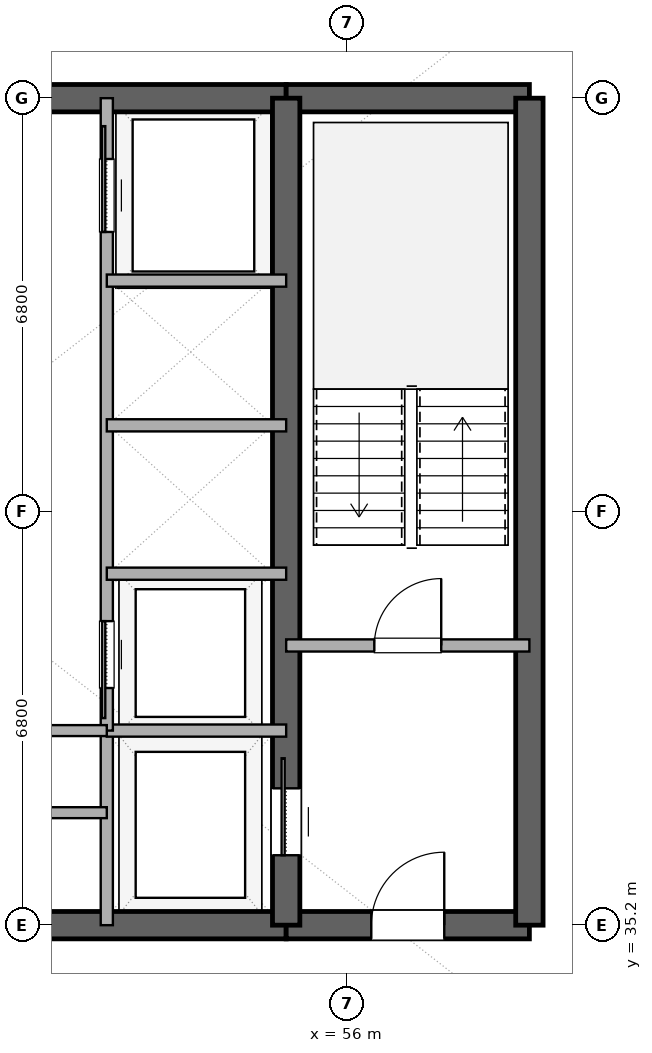
"""IFC4 building model, lengths in metres.
Left out: names, types, materials, properties, quantities, classifications, styles, units other than length and angle.
Written with IfcOpenShell. Run it as: python <this file> out.ifc"""

import sys

from ifc_helpers import new_model, si_unit, direction, frame, frame_2d, origin, place, context, subcontext, project, spatial, rectangle, extrude, element, fill, save


model = new_model("IFC4")
c1 = context("Model", 3, precision=1e-05, world=origin(), true_north=direction((0.0, 1.0)))
c2 = subcontext(c1, "Body", "Model", "MODEL_VIEW")
j1 = project(units=[si_unit("LENGTHUNIT", "METRE"), si_unit("PLANEANGLEUNIT", "RADIAN")], contexts=[c1])
p1 = place(None, origin())
s1 = spatial("IfcSite", under=j1, at=p1, CompositionType="ELEMENT")
p2 = place(p1, origin())
s2 = spatial("IfcBuilding", under=s1, at=p2, CompositionType="ELEMENT")
p3 = place(p2, frame((0.0, 0.0, 154.2)))
s3 = spatial("IfcBuildingStorey", under=s2, at=p3, CompositionType="ELEMENT", Elevation=154.2)
p4 = place(p3, frame((41.0, 35.2, 0.0), z_axis=(0.0, 0.0, 1.0), x_axis=(1.0, 0.0, 0.0)))
e1 = element("IfcWall", 1, at=p4, inside=s3, PredefinedType="SHEAR", context=c2, shape_type="SweptSolid", body=[
    extrude(rectangle(XDim=14.0, YDim=0.45, at=frame_2d((7.0, 0.0))), origin(), (0.0, 0.0, 1.0), 3.38),
])
p5 = place(p4, frame((6.1, 0.0, 0.0)))
e2 = element("IfcOpeningElement", 2, at=p5, cuts=e1, PredefinedType="OPENING", context=c2, shape_type="SweptSolid", body=[
    extrude(rectangle(XDim=1.8, YDim=2.25, at=frame_2d((0.9, 1.125))), frame((0.0, 0.235, 0.0), z_axis=(0.0, -1.0, 0.0), x_axis=(1.0, 0.0, 0.0)), (0.0, 0.0, 1.0), 0.47),
])
p6 = place(p3, frame((55.0, 35.2, 0.0), z_axis=(0.0, 0.0, 1.0), x_axis=(1.0, 0.0, 0.0)))
e3 = element("IfcWall", 3, at=p6, inside=s3, PredefinedType="SHEAR", context=c2, shape_type="SweptSolid", body=[
    extrude(rectangle(XDim=4.0, YDim=0.45, at=frame_2d((2.0, 0.0))), origin(), (0.0, 0.0, 1.0), 3.38),
])
p7 = place(p6, frame((1.4, 0.0, 0.0)))
e4 = element("IfcOpeningElement", 4, at=p7, cuts=e3, PredefinedType="OPENING", context=c2, shape_type="SweptSolid", body=[
    extrude(rectangle(XDim=1.2, YDim=2.15, at=frame_2d((0.6, 1.075))), frame((0.0, 0.235, 0.0), z_axis=(0.0, -1.0, 0.0), x_axis=(1.0, 0.0, 0.0)), (0.0, 0.0, 1.0), 0.47),
])
p8 = place(p3, frame((41.0, 48.8, 0.0), z_axis=(0.0, 0.0, 1.0), x_axis=(1.0, 0.0, 0.0)))
e5 = element("IfcWall", 5, at=p8, inside=s3, PredefinedType="SHEAR", context=c2, shape_type="SweptSolid", body=[
    extrude(rectangle(XDim=14.0, YDim=0.45, at=frame_2d((7.0, 0.0))), origin(), (0.0, 0.0, 1.0), 3.38),
])
p9 = place(p8, frame((6.1, 0.0, 0.0)))
e6 = element("IfcOpeningElement", 6, at=p9, cuts=e5, PredefinedType="OPENING", context=c2, shape_type="SweptSolid", body=[
    extrude(rectangle(XDim=1.8, YDim=2.25, at=frame_2d((0.9, 1.125))), frame((0.0, 0.235, 0.0), z_axis=(0.0, -1.0, 0.0), x_axis=(1.0, 0.0, 0.0)), (0.0, 0.0, 1.0), 0.47),
])
p10 = place(p3, frame((55.0, 48.8, 0.0), z_axis=(0.0, 0.0, 1.0), x_axis=(1.0, 0.0, 0.0)))
e7 = element("IfcWall", 7, at=p10, inside=s3, PredefinedType="SHEAR", context=c2, shape_type="SweptSolid", body=[
    extrude(rectangle(XDim=4.0, YDim=0.45, at=frame_2d((2.0, 0.0))), origin(), (0.0, 0.0, 1.0), 3.38),
])
p11 = place(p3, frame((59.0, 35.2, 0.0), z_axis=(0.0, 0.0, 1.0), x_axis=(0.0, 1.0, 0.0)))
e8 = element("IfcWall", 8, at=p11, inside=s3, PredefinedType="SHEAR", context=c2, shape_type="SweptSolid", body=[
    extrude(rectangle(XDim=13.6, YDim=0.45, at=frame_2d((6.8, 0.0))), origin(), (0.0, 0.0, 1.0), 3.38),
])
p12 = place(p3, frame((55.0, 35.2, 0.0), z_axis=(0.0, 0.0, 1.0), x_axis=(0.0, 1.0, 0.0)))
e9 = element("IfcWall", 9, at=p12, inside=s3, PredefinedType="SHEAR", context=c2, shape_type="SweptSolid", body=[
    extrude(rectangle(XDim=13.6, YDim=0.45, at=frame_2d((6.8, 0.0))), origin(), (0.0, 0.0, 1.0), 3.38),
])
p13 = place(p12, frame((1.15, 0.0, 0.0)))
e10 = element("IfcOpeningElement", 10, at=p13, cuts=e9, PredefinedType="OPENING", context=c2, shape_type="SweptSolid", body=[
    extrude(rectangle(XDim=1.1, YDim=2.2, at=frame_2d((0.55, 1.1))), frame((0.0, 0.235, 0.0), z_axis=(0.0, -1.0, 0.0), x_axis=(1.0, 0.0, 0.0)), (0.0, 0.0, 1.0), 0.47),
])
p14 = place(p3, frame((55.0, 39.8, 0.0), z_axis=(0.0, 0.0, 1.0), x_axis=(1.0, 0.0, 0.0)))
e11 = element("IfcWall", 11, at=p14, inside=s3, PredefinedType="SOLIDWALL", context=c2, shape_type="SweptSolid", body=[
    extrude(rectangle(XDim=4.0, YDim=0.2, at=frame_2d((2.0, 0.0))), origin(), (0.0, 0.0, 1.0), 2.74),
])
p15 = place(p14, frame((1.45, 0.0, 0.0)))
e12 = element("IfcOpeningElement", 12, at=p15, cuts=e11, PredefinedType="OPENING", context=c2, shape_type="SweptSolid", body=[
    extrude(rectangle(XDim=1.1, YDim=2.15, at=frame_2d((0.55, 1.075))), frame((0.0, 0.11, 0.0), z_axis=(0.0, -1.0, 0.0), x_axis=(1.0, 0.0, 0.0)), (0.0, 0.0, 1.0), 0.22),
])
p16 = place(p3, frame((52.05, 35.2, 0.0), z_axis=(0.0, 0.0, 1.0), x_axis=(0.0, 1.0, 0.0)))
e13 = element("IfcWall", 13, at=p16, inside=s3, PredefinedType="SOLIDWALL", context=c2, shape_type="SweptSolid", body=[
    extrude(rectangle(XDim=3.2, YDim=0.2, at=frame_2d((1.6, 0.0))), origin(), (0.0, 0.0, 1.0), 2.74),
])
p17 = place(p3, frame((52.05, 38.4, 0.0), z_axis=(0.0, 0.0, 1.0), x_axis=(1.0, 0.0, 0.0)))
e14 = element("IfcWall", 14, at=p17, inside=s3, PredefinedType="SOLIDWALL", context=c2, shape_type="SweptSolid", body=[
    extrude(rectangle(XDim=2.95, YDim=0.2, at=frame_2d((1.475, 0.0))), origin(), (0.0, 0.0, 1.0), 2.74),
])
p18 = place(p3, frame((52.05, 38.4, 0.0), z_axis=(0.0, 0.0, 1.0), x_axis=(0.0, 1.0, 0.0)))
e15 = element("IfcWall", 15, at=p18, inside=s3, PredefinedType="SOLIDWALL", context=c2, shape_type="SweptSolid", body=[
    extrude(rectangle(XDim=10.4, YDim=0.2, at=frame_2d((5.2, 0.0))), origin(), (0.0, 0.0, 1.0), 2.74),
])
p19 = place(p18, frame((0.7, 0.0, 0.0)))
e16 = element("IfcOpeningElement", 16, at=p19, cuts=e15, PredefinedType="OPENING", context=c2, shape_type="SweptSolid", body=[
    extrude(rectangle(XDim=1.1, YDim=2.2, at=frame_2d((0.55, 1.1))), frame((0.0, 0.11, 0.0), z_axis=(0.0, -1.0, 0.0), x_axis=(1.0, 0.0, 0.0)), (0.0, 0.0, 1.0), 0.22),
])
p20 = place(p18, frame((8.2, 0.0, 0.0)))
e17 = element("IfcOpeningElement", 17, at=p20, cuts=e15, PredefinedType="OPENING", context=c2, shape_type="SweptSolid", body=[
    extrude(rectangle(XDim=1.2, YDim=2.2, at=frame_2d((0.6, 1.1))), frame((0.0, 0.11, 0.0), z_axis=(0.0, -1.0, 0.0), x_axis=(1.0, 0.0, 0.0)), (0.0, 0.0, 1.0), 0.22),
])
for number, where, z_axis, x_axis in (
    (18, (52.05, 40.98, 0.0), (0.0, 0.0, 1.0), (1.0, 0.0, 0.0)),
    (19, (52.05, 43.42, 0.0), (0.0, 0.0, 1.0), (1.0, 0.0, 0.0)),
    (20, (52.05, 45.8, 0.0), (0.0, 0.0, 1.0), (1.0, 0.0, 0.0)),
):
    element("IfcWall", number, at=place(p3, frame(where, z_axis=z_axis, x_axis=x_axis)), inside=s3, PredefinedType="SOLIDWALL", context=c2, shape_type="SweptSolid", body=[
        extrude(rectangle(XDim=2.95, YDim=0.2, at=frame_2d((1.475, 0.0))), origin(), (0.0, 0.0, 1.0), 2.74),
    ])
for number, where, z_axis, x_axis in (
    (21, (49.2, 37.05, 0.0), (0.0, 0.0, 1.0), (1.0, 0.0, 0.0)),
    (22, (49.2, 38.4, 0.0), (0.0, 0.0, 1.0), (1.0, 0.0, 0.0)),
):
    element("IfcWall", number, at=place(p3, frame(where, z_axis=z_axis, x_axis=x_axis)), inside=s3, PredefinedType="PLUMBINGWALL", context=c2, shape_type="SweptSolid", body=[
        extrude(rectangle(XDim=2.85, YDim=0.18, at=frame_2d((1.425, 0.0))), origin(), (0.0, 0.0, 1.0), 2.74),
    ])
p21 = place(p13, origin())
e23 = element("IfcDoor", 23, at=p21, inside=s3, OperationType="SLIDING_TO_RIGHT", PredefinedType="DOOR", context=c2, shape_type="SweptSolid", body=[
    extrude(rectangle(XDim=1.1, YDim=2.2, at=frame_2d((0.55, 1.1))), frame((0.0, 0.025, 0.0), z_axis=(0.0, -1.0, 0.0), x_axis=(1.0, 0.0, 0.0)), (0.0, 0.0, 1.0), 0.05),
])
fill(e10, e23)
p22 = place(p7, origin())
e24 = element("IfcDoor", 24, at=p22, inside=s3, OperationType="SINGLE_SWING_RIGHT", PredefinedType="DOOR", context=c2, shape_type="SweptSolid", body=[
    extrude(rectangle(XDim=1.2, YDim=2.15, at=frame_2d((0.6, 1.075))), frame((0.0, 0.025, 0.0), z_axis=(0.0, -1.0, 0.0), x_axis=(1.0, 0.0, 0.0)), (0.0, 0.0, 1.0), 0.05),
])
fill(e4, e24)
p23 = place(p15, origin())
e25 = element("IfcDoor", 25, at=p23, inside=s3, OperationType="SINGLE_SWING_RIGHT", PredefinedType="DOOR", context=c2, shape_type="SweptSolid", body=[
    extrude(rectangle(XDim=1.1, YDim=2.15, at=frame_2d((0.55, 1.075))), frame((0.0, 0.025, 0.0), z_axis=(0.0, -1.0, 0.0), x_axis=(1.0, 0.0, 0.0)), (0.0, 0.0, 1.0), 0.05),
])
fill(e12, e25)
p24 = place(p19, origin())
e26 = element("IfcDoor", 26, at=p24, inside=s3, OperationType="SLIDING_TO_LEFT", PredefinedType="DOOR", context=c2, shape_type="SweptSolid", body=[
    extrude(rectangle(XDim=1.1, YDim=2.2, at=frame_2d((0.55, 1.1))), frame((0.0, 0.025, 0.0), z_axis=(0.0, -1.0, 0.0), x_axis=(1.0, 0.0, 0.0)), (0.0, 0.0, 1.0), 0.05),
])
fill(e16, e26)
p25 = place(p20, origin())
e27 = element("IfcDoor", 27, at=p25, inside=s3, OperationType="SLIDING_TO_RIGHT", PredefinedType="DOOR", context=c2, shape_type="SweptSolid", body=[
    extrude(rectangle(XDim=1.2, YDim=2.2, at=frame_2d((0.6, 1.1))), frame((0.0, 0.025, 0.0), z_axis=(0.0, -1.0, 0.0), x_axis=(1.0, 0.0, 0.0)), (0.0, 0.0, 1.0), 0.05),
])
fill(e17, e27)
save(model, sys.argv[1])
